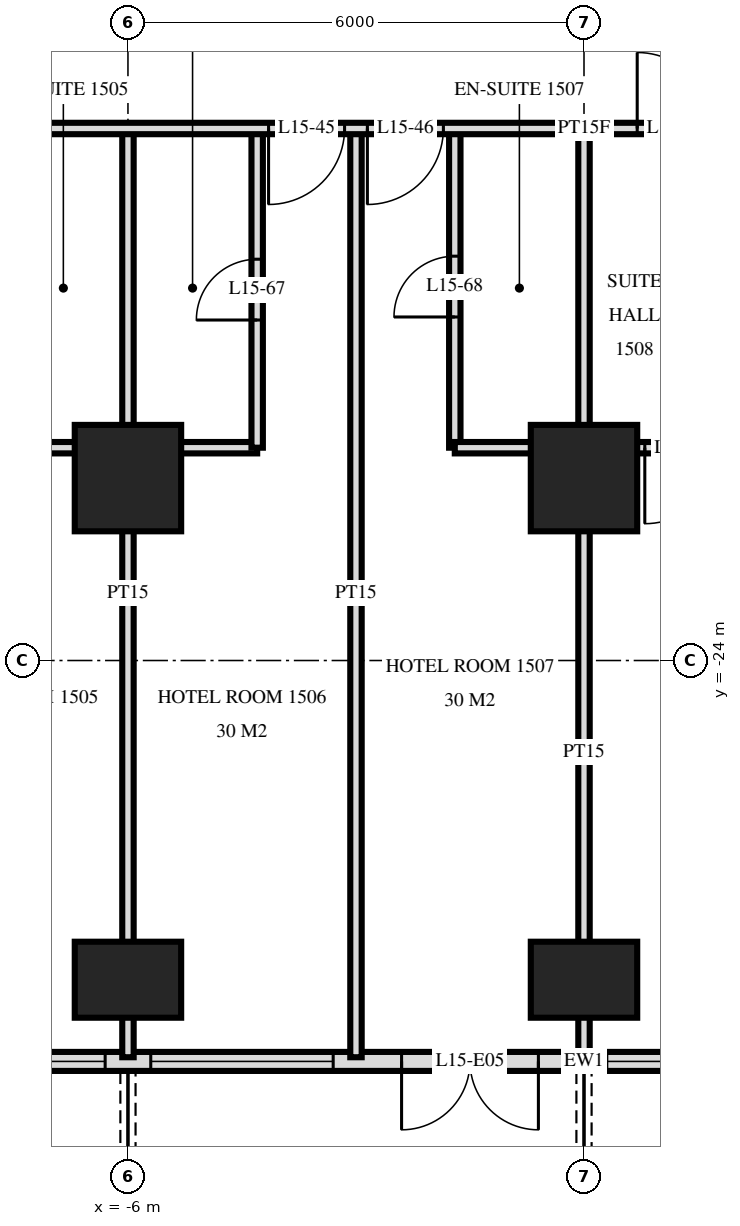
"""IFC4 building model, lengths in metres.
Left out: names, types, materials, properties, quantities, classifications, styles, units other than length and angle.
Written with IfcOpenShell. Run it as: python <this file> out.ifc"""

import sys

from ifc_helpers import new_model, si_unit, direction, frame, frame_2d, origin, origin_2d, place, context, subcontext, project, spatial, rectangle, extrude, element, fill, save


model = new_model("IFC4")
c1 = context("Model", 3, precision=1e-05, world=origin(), true_north=direction((0.0, 1.0)))
c2 = subcontext(c1, "Body", "Model", "MODEL_VIEW")
j1 = project(units=[si_unit("LENGTHUNIT", "METRE"), si_unit("PLANEANGLEUNIT", "RADIAN")], contexts=[c1])
p1 = place(None, origin())
s1 = spatial("IfcSite", under=j1, at=p1, CompositionType="ELEMENT")
p2 = place(p1, origin())
s2 = spatial("IfcBuilding", under=s1, at=p2, CompositionType="ELEMENT")
p3 = place(p2, frame((0.0, 0.0, 63.6)))
s3 = spatial("IfcBuildingStorey", under=s2, at=p3, CompositionType="ELEMENT", Elevation=63.6)
p4 = place(p3, frame((-6.0, -28.2, 0.0), z_axis=(0.0, 0.0, 1.0), x_axis=(1.0, 0.0, 0.0)))
e1 = element("IfcColumn", 1, at=p4, inside=s3, PredefinedType="COLUMN", context=c2, shape_type="SweptSolid", body=[
    extrude(rectangle(XDim=1.4, YDim=1.0, at=origin_2d()), origin(), (0.0, 0.0, 1.0), 3.6),
])
p5 = place(p3, frame((-6.0, -21.6, 0.0), z_axis=(0.0, 0.0, 1.0), x_axis=(1.0, 0.0, 0.0)))
e2 = element("IfcColumn", 2, at=p5, inside=s3, PredefinedType="COLUMN", context=c2, shape_type="SweptSolid", body=[
    extrude(rectangle(XDim=1.4, YDim=1.4, at=origin_2d()), origin(), (0.0, 0.0, 1.0), 3.6),
])
p6 = place(p3, frame((0.0, -28.2, 0.0), z_axis=(0.0, 0.0, 1.0), x_axis=(1.0, 0.0, 0.0)))
e3 = element("IfcColumn", 3, at=p6, inside=s3, PredefinedType="COLUMN", context=c2, shape_type="SweptSolid", body=[
    extrude(rectangle(XDim=1.4, YDim=1.0, at=origin_2d()), origin(), (0.0, 0.0, 1.0), 3.6),
])
p7 = place(p3, frame((0.0, -21.6, 0.0), z_axis=(0.0, 0.0, 1.0), x_axis=(1.0, 0.0, 0.0)))
e4 = element("IfcColumn", 4, at=p7, inside=s3, PredefinedType="COLUMN", context=c2, shape_type="SweptSolid", body=[
    extrude(rectangle(XDim=1.4, YDim=1.4, at=origin_2d()), origin(), (0.0, 0.0, 1.0), 3.6),
])
p8 = place(p3, frame((-28.775, -29.275, 0.0), z_axis=(0.0, 0.0, 1.0), x_axis=(1.0, 0.0, 0.0)))
e5 = element("IfcWall", 5, at=p8, inside=s3, PredefinedType="SOLIDWALL", context=c2, shape_type="SweptSolid", body=[
    extrude(rectangle(XDim=57.551, YDim=0.25, at=frame_2d((28.775, 0.0))), origin(), (0.0, 0.0, 1.0), 3.32),
])
p9 = place(p8, frame((0.575, 0.0, 0.0)))
e6 = element("IfcOpeningElement", 6, at=p9, cuts=e5, PredefinedType="OPENING", context=c2, shape_type="SweptSolid", body=[
    extrude(rectangle(XDim=1.8, YDim=2.4, at=frame_2d((0.9, 1.2))), frame((0.0, 0.135, 0.0), z_axis=(0.0, -1.0, 0.0), x_axis=(1.0, 0.0, 0.0)), (0.0, 0.0, 1.0), 0.27),
])
p10 = place(p8, frame((5.375, 0.0, 0.0)))
e7 = element("IfcOpeningElement", 7, at=p10, cuts=e5, PredefinedType="OPENING", context=c2, shape_type="SweptSolid", body=[
    extrude(rectangle(XDim=1.8, YDim=2.4, at=frame_2d((0.9, 1.2))), frame((0.0, 0.135, 0.0), z_axis=(0.0, -1.0, 0.0), x_axis=(1.0, 0.0, 0.0)), (0.0, 0.0, 1.0), 0.27),
])
p11 = place(p8, frame((8.075, 0.0, 0.3)))
e8 = element("IfcOpeningElement", 8, at=p11, cuts=e5, PredefinedType="OPENING", context=c2, shape_type="SweptSolid", body=[
    extrude(rectangle(XDim=2.4, YDim=2.1, at=frame_2d((1.2, 1.05))), frame((0.0, 0.135, 0.0), z_axis=(0.0, -1.0, 0.0), x_axis=(1.0, 0.0, 0.0)), (0.0, 0.0, 1.0), 0.27),
])
p12 = place(p8, frame((11.375, 0.0, 0.0)))
e9 = element("IfcOpeningElement", 9, at=p12, cuts=e5, PredefinedType="OPENING", context=c2, shape_type="SweptSolid", body=[
    extrude(rectangle(XDim=1.8, YDim=2.4, at=frame_2d((0.9, 1.2))), frame((0.0, 0.135, 0.0), z_axis=(0.0, -1.0, 0.0), x_axis=(1.0, 0.0, 0.0)), (0.0, 0.0, 1.0), 0.27),
])
p13 = place(p8, frame((14.075, 0.0, 0.3)))
e10 = element("IfcOpeningElement", 10, at=p13, cuts=e5, PredefinedType="OPENING", context=c2, shape_type="SweptSolid", body=[
    extrude(rectangle(XDim=2.4, YDim=2.1, at=frame_2d((1.2, 1.05))), frame((0.0, 0.135, 0.0), z_axis=(0.0, -1.0, 0.0), x_axis=(1.0, 0.0, 0.0)), (0.0, 0.0, 1.0), 0.27),
])
p14 = place(p8, frame((17.375, 0.0, 0.0)))
e11 = element("IfcOpeningElement", 11, at=p14, cuts=e5, PredefinedType="OPENING", context=c2, shape_type="SweptSolid", body=[
    extrude(rectangle(XDim=1.8, YDim=2.4, at=frame_2d((0.9, 1.2))), frame((0.0, 0.135, 0.0), z_axis=(0.0, -1.0, 0.0), x_axis=(1.0, 0.0, 0.0)), (0.0, 0.0, 1.0), 0.27),
])
p15 = place(p8, frame((20.075, 0.0, 0.3)))
e12 = element("IfcOpeningElement", 12, at=p15, cuts=e5, PredefinedType="OPENING", context=c2, shape_type="SweptSolid", body=[
    extrude(rectangle(XDim=2.4, YDim=2.1, at=frame_2d((1.2, 1.05))), frame((0.0, 0.135, 0.0), z_axis=(0.0, -1.0, 0.0), x_axis=(1.0, 0.0, 0.0)), (0.0, 0.0, 1.0), 0.27),
])
p16 = place(p8, frame((23.075, 0.0, 0.3)))
e13 = element("IfcOpeningElement", 13, at=p16, cuts=e5, PredefinedType="OPENING", context=c2, shape_type="SweptSolid", body=[
    extrude(rectangle(XDim=2.4, YDim=2.1, at=frame_2d((1.2, 1.05))), frame((0.0, 0.135, 0.0), z_axis=(0.0, -1.0, 0.0), x_axis=(1.0, 0.0, 0.0)), (0.0, 0.0, 1.0), 0.27),
])
p17 = place(p8, frame((26.375, 0.0, 0.0)))
e14 = element("IfcOpeningElement", 14, at=p17, cuts=e5, PredefinedType="OPENING", context=c2, shape_type="SweptSolid", body=[
    extrude(rectangle(XDim=1.8, YDim=2.4, at=frame_2d((0.9, 1.2))), frame((0.0, 0.135, 0.0), z_axis=(0.0, -1.0, 0.0), x_axis=(1.0, 0.0, 0.0)), (0.0, 0.0, 1.0), 0.27),
])
p18 = place(p8, frame((29.075, 0.0, 0.3)))
e15 = element("IfcOpeningElement", 15, at=p18, cuts=e5, PredefinedType="OPENING", context=c2, shape_type="SweptSolid", body=[
    extrude(rectangle(XDim=2.4, YDim=2.1, at=frame_2d((1.2, 1.05))), frame((0.0, 0.135, 0.0), z_axis=(0.0, -1.0, 0.0), x_axis=(1.0, 0.0, 0.0)), (0.0, 0.0, 1.0), 0.27),
])
p19 = place(p8, frame((32.375, 0.0, 0.0)))
e16 = element("IfcOpeningElement", 16, at=p19, cuts=e5, PredefinedType="OPENING", context=c2, shape_type="SweptSolid", body=[
    extrude(rectangle(XDim=1.8, YDim=2.4, at=frame_2d((0.9, 1.2))), frame((0.0, 0.135, 0.0), z_axis=(0.0, -1.0, 0.0), x_axis=(1.0, 0.0, 0.0)), (0.0, 0.0, 1.0), 0.27),
])
p20 = place(p8, frame((35.375, 0.0, 0.0)))
e17 = element("IfcOpeningElement", 17, at=p20, cuts=e5, PredefinedType="OPENING", context=c2, shape_type="SweptSolid", body=[
    extrude(rectangle(XDim=1.8, YDim=2.4, at=frame_2d((0.9, 1.2))), frame((0.0, 0.135, 0.0), z_axis=(0.0, -1.0, 0.0), x_axis=(1.0, 0.0, 0.0)), (0.0, 0.0, 1.0), 0.27),
])
p21 = place(p8, frame((38.075, 0.0, 0.3)))
e18 = element("IfcOpeningElement", 18, at=p21, cuts=e5, PredefinedType="OPENING", context=c2, shape_type="SweptSolid", body=[
    extrude(rectangle(XDim=2.4, YDim=2.1, at=frame_2d((1.2, 1.05))), frame((0.0, 0.135, 0.0), z_axis=(0.0, -1.0, 0.0), x_axis=(1.0, 0.0, 0.0)), (0.0, 0.0, 1.0), 0.27),
])
p22 = place(p8, frame((41.375, 0.0, 0.0)))
e19 = element("IfcOpeningElement", 19, at=p22, cuts=e5, PredefinedType="OPENING", context=c2, shape_type="SweptSolid", body=[
    extrude(rectangle(XDim=1.8, YDim=2.4, at=frame_2d((0.9, 1.2))), frame((0.0, 0.135, 0.0), z_axis=(0.0, -1.0, 0.0), x_axis=(1.0, 0.0, 0.0)), (0.0, 0.0, 1.0), 0.27),
])
p23 = place(p8, frame((44.075, 0.0, 0.3)))
e20 = element("IfcOpeningElement", 20, at=p23, cuts=e5, PredefinedType="OPENING", context=c2, shape_type="SweptSolid", body=[
    extrude(rectangle(XDim=2.4, YDim=2.1, at=frame_2d((1.2, 1.05))), frame((0.0, 0.135, 0.0), z_axis=(0.0, -1.0, 0.0), x_axis=(1.0, 0.0, 0.0)), (0.0, 0.0, 1.0), 0.27),
])
p24 = place(p8, frame((47.075, 0.0, 0.3)))
e21 = element("IfcOpeningElement", 21, at=p24, cuts=e5, PredefinedType="OPENING", context=c2, shape_type="SweptSolid", body=[
    extrude(rectangle(XDim=2.4, YDim=2.1, at=frame_2d((1.2, 1.05))), frame((0.0, 0.135, 0.0), z_axis=(0.0, -1.0, 0.0), x_axis=(1.0, 0.0, 0.0)), (0.0, 0.0, 1.0), 0.27),
])
p25 = place(p8, frame((50.375, 0.0, 0.0)))
e22 = element("IfcOpeningElement", 22, at=p25, cuts=e5, PredefinedType="OPENING", context=c2, shape_type="SweptSolid", body=[
    extrude(rectangle(XDim=1.8, YDim=2.4, at=frame_2d((0.9, 1.2))), frame((0.0, 0.135, 0.0), z_axis=(0.0, -1.0, 0.0), x_axis=(1.0, 0.0, 0.0)), (0.0, 0.0, 1.0), 0.27),
])
p26 = place(p8, frame((53.375, 0.0, 0.0)))
e23 = element("IfcOpeningElement", 23, at=p26, cuts=e5, PredefinedType="OPENING", context=c2, shape_type="SweptSolid", body=[
    extrude(rectangle(XDim=1.8, YDim=2.4, at=frame_2d((0.9, 1.2))), frame((0.0, 0.135, 0.0), z_axis=(0.0, -1.0, 0.0), x_axis=(1.0, 0.0, 0.0)), (0.0, 0.0, 1.0), 0.27),
])
p27 = place(p3, frame((0.0, -21.2, 0.0), z_axis=(0.0, 0.0, 1.0), x_axis=(0.0, 1.0, 0.0)))
e24 = element("IfcWall", 24, at=p27, inside=s3, PredefinedType="PARTITIONING", context=c2, shape_type="SweptSolid", body=[
    extrude(rectangle(XDim=4.2, YDim=0.15, at=frame_2d((2.1, 0.0))), origin(), (0.0, 0.0, 1.0), 3.32),
])
p28 = place(p3, frame((0.0, -29.22, 0.0), z_axis=(0.0, 0.0, 1.0), x_axis=(0.0, 1.0, 0.0)))
e25 = element("IfcWall", 25, at=p28, inside=s3, PredefinedType="PARTITIONING", context=c2, shape_type="SweptSolid", body=[
    extrude(rectangle(XDim=8.02, YDim=0.15, at=frame_2d((4.01, 0.0))), origin(), (0.0, 0.0, 1.0), 3.32),
])
p29 = place(p3, frame((-1.7, -21.2, 0.0), z_axis=(0.0, 0.0, 1.0), x_axis=(0.0, 1.0, 0.0)))
e26 = element("IfcWall", 26, at=p29, inside=s3, PredefinedType="PARTITIONING", context=c2, shape_type="SweptSolid", body=[
    extrude(rectangle(XDim=4.2, YDim=0.15, at=frame_2d((2.1, 0.0))), origin(), (0.0, 0.0, 1.0), 3.32),
])
p30 = place(p29, frame((1.72, 0.0, 0.0)))
e27 = element("IfcOpeningElement", 27, at=p30, cuts=e26, PredefinedType="OPENING", context=c2, shape_type="SweptSolid", body=[
    extrude(rectangle(XDim=0.8, YDim=2.1, at=frame_2d((0.4, 1.05))), frame((0.0, 0.085, 0.0), z_axis=(0.0, -1.0, 0.0), x_axis=(1.0, 0.0, 0.0)), (0.0, 0.0, 1.0), 0.17),
])
p31 = place(p3, frame((-3.0, -29.22, 0.0), z_axis=(0.0, 0.0, 1.0), x_axis=(0.0, 1.0, 0.0)))
e28 = element("IfcWall", 28, at=p31, inside=s3, PredefinedType="PARTITIONING", context=c2, shape_type="SweptSolid", body=[
    extrude(rectangle(XDim=12.22, YDim=0.15, at=frame_2d((6.11, 0.0))), origin(), (0.0, 0.0, 1.0), 3.32),
])
p32 = place(p3, frame((-4.3, -21.2, 0.0), z_axis=(0.0, 0.0, 1.0), x_axis=(0.0, 1.0, 0.0)))
e29 = element("IfcWall", 29, at=p32, inside=s3, PredefinedType="PARTITIONING", context=c2, shape_type="SweptSolid", body=[
    extrude(rectangle(XDim=4.2, YDim=0.15, at=frame_2d((2.1, 0.0))), origin(), (0.0, 0.0, 1.0), 3.32),
])
p33 = place(p32, frame((1.68, 0.0, 0.0)))
e30 = element("IfcOpeningElement", 30, at=p33, cuts=e29, PredefinedType="OPENING", context=c2, shape_type="SweptSolid", body=[
    extrude(rectangle(XDim=0.8, YDim=2.1, at=frame_2d((0.4, 1.05))), frame((0.0, 0.085, 0.0), z_axis=(0.0, -1.0, 0.0), x_axis=(1.0, 0.0, 0.0)), (0.0, 0.0, 1.0), 0.17),
])
p34 = place(p3, frame((-6.0, -29.22, 0.0), z_axis=(0.0, 0.0, 1.0), x_axis=(0.0, 1.0, 0.0)))
e31 = element("IfcWall", 31, at=p34, inside=s3, PredefinedType="PARTITIONING", context=c2, shape_type="SweptSolid", body=[
    extrude(rectangle(XDim=12.22, YDim=0.15, at=frame_2d((6.11, 0.0))), origin(), (0.0, 0.0, 1.0), 3.32),
])
p35 = place(p3, frame((0.0, -21.2, 0.0), z_axis=(0.0, 0.0, 1.0), x_axis=(1.0, 0.0, 0.0)))
e32 = element("IfcWall", 32, at=p35, inside=s3, PredefinedType="PARTITIONING", context=c2, shape_type="SweptSolid", body=[
    extrude(rectangle(XDim=2.4, YDim=0.15, at=frame_2d((1.2, 0.0))), origin(), (0.0, 0.0, 1.0), 3.32),
])
p36 = place(p35, frame((0.8, 0.0, 0.0)))
e33 = element("IfcOpeningElement", 33, at=p36, cuts=e32, PredefinedType="OPENING", context=c2, shape_type="SweptSolid", body=[
    extrude(rectangle(XDim=1.0, YDim=2.1, at=frame_2d((0.5, 1.05))), frame((0.0, 0.085, 0.0), z_axis=(0.0, -1.0, 0.0), x_axis=(1.0, 0.0, 0.0)), (0.0, 0.0, 1.0), 0.17),
])
p37 = place(p3, frame((-7.7, -21.2, 0.0), z_axis=(0.0, 0.0, 1.0), x_axis=(1.0, 0.0, 0.0)))
e34 = element("IfcWall", 34, at=p37, inside=s3, PredefinedType="PARTITIONING", context=c2, shape_type="SweptSolid", body=[
    extrude(rectangle(XDim=3.4, YDim=0.15, at=frame_2d((1.7, 0.0))), origin(), (0.0, 0.0, 1.0), 3.32),
])
p38 = place(p3, frame((-1.7, -21.2, 0.0), z_axis=(0.0, 0.0, 1.0), x_axis=(1.0, 0.0, 0.0)))
e35 = element("IfcWall", 35, at=p38, inside=s3, PredefinedType="PARTITIONING", context=c2, shape_type="SweptSolid", body=[
    extrude(rectangle(XDim=1.7, YDim=0.15, at=frame_2d((0.85, 0.0))), origin(), (0.0, 0.0, 1.0), 3.32),
])
p39 = place(p3, frame((-33.12, -17.0, 0.0), z_axis=(0.0, 0.0, 1.0), x_axis=(1.0, 0.0, 0.0)))
e36 = element("IfcWall", 36, at=p39, inside=s3, PredefinedType="PARTITIONING", context=c2, shape_type="SweptSolid", body=[
    extrude(rectangle(XDim=66.24, YDim=0.15, at=frame_2d((33.12, 0.0))), origin(), (0.0, 0.0, 1.0), 3.32),
])
p40 = place(p39, frame((12.27, 0.0, 0.0)))
e37 = element("IfcOpeningElement", 37, at=p40, cuts=e36, PredefinedType="OPENING", context=c2, shape_type="SweptSolid", body=[
    extrude(rectangle(XDim=1.0, YDim=2.1, at=frame_2d((0.5, 1.05))), frame((0.0, 0.085, 0.0), z_axis=(0.0, -1.0, 0.0), x_axis=(1.0, 0.0, 0.0)), (0.0, 0.0, 1.0), 0.17),
])
p41 = place(p39, frame((16.97, 0.0, 0.0)))
e38 = element("IfcOpeningElement", 38, at=p41, cuts=e36, PredefinedType="OPENING", context=c2, shape_type="SweptSolid", body=[
    extrude(rectangle(XDim=1.0, YDim=2.1, at=frame_2d((0.5, 1.05))), frame((0.0, 0.085, 0.0), z_axis=(0.0, -1.0, 0.0), x_axis=(1.0, 0.0, 0.0)), (0.0, 0.0, 1.0), 0.17),
])
p42 = place(p39, frame((18.27, 0.0, 0.0)))
e39 = element("IfcOpeningElement", 39, at=p42, cuts=e36, PredefinedType="OPENING", context=c2, shape_type="SweptSolid", body=[
    extrude(rectangle(XDim=1.0, YDim=2.1, at=frame_2d((0.5, 1.05))), frame((0.0, 0.085, 0.0), z_axis=(0.0, -1.0, 0.0), x_axis=(1.0, 0.0, 0.0)), (0.0, 0.0, 1.0), 0.17),
])
p43 = place(p39, frame((22.97, 0.0, 0.0)))
e40 = element("IfcOpeningElement", 40, at=p43, cuts=e36, PredefinedType="OPENING", context=c2, shape_type="SweptSolid", body=[
    extrude(rectangle(XDim=1.0, YDim=2.1, at=frame_2d((0.5, 1.05))), frame((0.0, 0.085, 0.0), z_axis=(0.0, -1.0, 0.0), x_axis=(1.0, 0.0, 0.0)), (0.0, 0.0, 1.0), 0.17),
])
p44 = place(p39, frame((24.27, 0.0, 0.0)))
e41 = element("IfcOpeningElement", 41, at=p44, cuts=e36, PredefinedType="OPENING", context=c2, shape_type="SweptSolid", body=[
    extrude(rectangle(XDim=1.0, YDim=2.1, at=frame_2d((0.5, 1.05))), frame((0.0, 0.085, 0.0), z_axis=(0.0, -1.0, 0.0), x_axis=(1.0, 0.0, 0.0)), (0.0, 0.0, 1.0), 0.17),
])
p45 = place(p39, frame((28.97, 0.0, 0.0)))
e42 = element("IfcOpeningElement", 42, at=p45, cuts=e36, PredefinedType="OPENING", context=c2, shape_type="SweptSolid", body=[
    extrude(rectangle(XDim=1.0, YDim=2.1, at=frame_2d((0.5, 1.05))), frame((0.0, 0.085, 0.0), z_axis=(0.0, -1.0, 0.0), x_axis=(1.0, 0.0, 0.0)), (0.0, 0.0, 1.0), 0.17),
])
p46 = place(p39, frame((30.27, 0.0, 0.0)))
e43 = element("IfcOpeningElement", 43, at=p46, cuts=e36, PredefinedType="OPENING", context=c2, shape_type="SweptSolid", body=[
    extrude(rectangle(XDim=1.0, YDim=2.1, at=frame_2d((0.5, 1.05))), frame((0.0, 0.085, 0.0), z_axis=(0.0, -1.0, 0.0), x_axis=(1.0, 0.0, 0.0)), (0.0, 0.0, 1.0), 0.17),
])
p47 = place(p39, frame((33.82, 0.0, 0.0)))
e44 = element("IfcOpeningElement", 44, at=p47, cuts=e36, PredefinedType="OPENING", context=c2, shape_type="SweptSolid", body=[
    extrude(rectangle(XDim=1.0, YDim=2.1, at=frame_2d((0.5, 1.05))), frame((0.0, 0.085, 0.0), z_axis=(0.0, -1.0, 0.0), x_axis=(1.0, 0.0, 0.0)), (0.0, 0.0, 1.0), 0.17),
])
p48 = place(p39, frame((46.27, 0.0, 0.0)))
e45 = element("IfcOpeningElement", 45, at=p48, cuts=e36, PredefinedType="OPENING", context=c2, shape_type="SweptSolid", body=[
    extrude(rectangle(XDim=1.0, YDim=2.1, at=frame_2d((0.5, 1.05))), frame((0.0, 0.085, 0.0), z_axis=(0.0, -1.0, 0.0), x_axis=(1.0, 0.0, 0.0)), (0.0, 0.0, 1.0), 0.17),
])
p49 = place(p39, frame((52.97, 0.0, 0.0)))
e46 = element("IfcOpeningElement", 46, at=p49, cuts=e36, PredefinedType="OPENING", context=c2, shape_type="SweptSolid", body=[
    extrude(rectangle(XDim=1.0, YDim=2.1, at=frame_2d((0.5, 1.05))), frame((0.0, 0.085, 0.0), z_axis=(0.0, -1.0, 0.0), x_axis=(1.0, 0.0, 0.0)), (0.0, 0.0, 1.0), 0.17),
])
p50 = place(p39, frame((6.05, 0.0, 0.0)))
e47 = element("IfcOpeningElement", 47, at=p50, cuts=e36, PredefinedType="OPENING", context=c2, shape_type="SweptSolid", body=[
    extrude(rectangle(XDim=1.0, YDim=2.1, at=frame_2d((0.5, 1.05))), frame((0.0, 0.085, 0.0), z_axis=(0.0, -1.0, 0.0), x_axis=(1.0, 0.0, 0.0)), (0.0, 0.0, 1.0), 0.17),
])
p51 = place(p39, frame((59.15, 0.0, 0.0)))
e48 = element("IfcOpeningElement", 48, at=p51, cuts=e36, PredefinedType="OPENING", context=c2, shape_type="SweptSolid", body=[
    extrude(rectangle(XDim=1.0, YDim=2.1, at=frame_2d((0.5, 1.05))), frame((0.0, 0.085, 0.0), z_axis=(0.0, -1.0, 0.0), x_axis=(1.0, 0.0, 0.0)), (0.0, 0.0, 1.0), 0.17),
])
p52 = place(p15, origin())
e49 = element("IfcWindow", 49, at=p52, inside=s3, PartitioningType="SINGLE_PANEL", PredefinedType="WINDOW", context=c2, shape_type="SweptSolid", body=[
    extrude(rectangle(XDim=2.4, YDim=2.1, at=frame_2d((1.2, 1.05))), frame((0.0, 0.03, 0.0), z_axis=(0.0, -1.0, 0.0), x_axis=(1.0, 0.0, 0.0)), (0.0, 0.0, 1.0), 0.06),
])
fill(e12, e49)
p53 = place(p16, origin())
e50 = element("IfcWindow", 50, at=p53, inside=s3, PartitioningType="SINGLE_PANEL", PredefinedType="WINDOW", context=c2, shape_type="SweptSolid", body=[
    extrude(rectangle(XDim=2.4, YDim=2.1, at=frame_2d((1.2, 1.05))), frame((0.0, 0.03, 0.0), z_axis=(0.0, -1.0, 0.0), x_axis=(1.0, 0.0, 0.0)), (0.0, 0.0, 1.0), 0.06),
])
fill(e13, e50)
p54 = place(p17, frame((0.9, 0.0, 0.0), z_axis=(0.0, 0.0, 1.0), x_axis=(-1.0, 0.0, 0.0)))
e51 = element("IfcDoor", 51, at=p54, inside=s3, OperationType="DOUBLE_DOOR_SINGLE_SWING", PredefinedType="DOOR", context=c2, shape_type="SweptSolid", body=[
    extrude(rectangle(XDim=1.8, YDim=2.4, at=frame_2d((0.0, 1.2))), frame((0.0, -0.025, 0.0), z_axis=(0.0, 1.0, 0.0), x_axis=(-1.0, 0.0, 0.0)), (0.0, 0.0, 1.0), 0.05),
])
fill(e14, e51)
p55 = place(p18, origin())
e52 = element("IfcWindow", 52, at=p55, inside=s3, PartitioningType="SINGLE_PANEL", PredefinedType="WINDOW", context=c2, shape_type="SweptSolid", body=[
    extrude(rectangle(XDim=2.4, YDim=2.1, at=frame_2d((1.2, 1.05))), frame((0.0, 0.03, 0.0), z_axis=(0.0, -1.0, 0.0), x_axis=(1.0, 0.0, 0.0)), (0.0, 0.0, 1.0), 0.06),
])
fill(e15, e52)
p56 = place(p45, frame((0.5, 0.0, 0.0), z_axis=(0.0, 0.0, 1.0), x_axis=(-1.0, 0.0, 0.0)))
e53 = element("IfcDoor", 53, at=p56, inside=s3, OperationType="SINGLE_SWING_LEFT", PredefinedType="DOOR", context=c2, shape_type="SweptSolid", body=[
    extrude(rectangle(XDim=1.0, YDim=2.1, at=frame_2d((0.0, 1.05))), frame((0.0, -0.025, 0.0), z_axis=(0.0, 1.0, 0.0), x_axis=(-1.0, 0.0, 0.0)), (0.0, 0.0, 1.0), 0.05),
])
fill(e42, e53)
p57 = place(p46, frame((0.5, 0.0, 0.0), z_axis=(0.0, 0.0, 1.0), x_axis=(-1.0, 0.0, 0.0)))
e54 = element("IfcDoor", 54, at=p57, inside=s3, OperationType="SINGLE_SWING_LEFT", PredefinedType="DOOR", context=c2, shape_type="SweptSolid", body=[
    extrude(rectangle(XDim=1.0, YDim=2.1, at=frame_2d((0.0, 1.05))), frame((0.0, -0.025, 0.0), z_axis=(0.0, 1.0, 0.0), x_axis=(-1.0, 0.0, 0.0)), (0.0, 0.0, 1.0), 0.05),
])
fill(e43, e54)
p58 = place(p47, origin())
e55 = element("IfcDoor", 55, at=p58, inside=s3, OperationType="SINGLE_SWING_RIGHT", PredefinedType="DOOR", context=c2, shape_type="SweptSolid", body=[
    extrude(rectangle(XDim=1.0, YDim=2.1, at=frame_2d((0.5, 1.05))), frame((0.0, 0.025, 0.0), z_axis=(0.0, -1.0, 0.0), x_axis=(1.0, 0.0, 0.0)), (0.0, 0.0, 1.0), 0.05),
])
fill(e44, e55)
p59 = place(p33, origin())
e56 = element("IfcDoor", 56, at=p59, inside=s3, OperationType="SINGLE_SWING_RIGHT", PredefinedType="DOOR", context=c2, shape_type="SweptSolid", body=[
    extrude(rectangle(XDim=0.8, YDim=2.1, at=frame_2d((0.4, 1.05))), frame((0.0, 0.025, 0.0), z_axis=(0.0, -1.0, 0.0), x_axis=(1.0, 0.0, 0.0)), (0.0, 0.0, 1.0), 0.05),
])
fill(e30, e56)
p60 = place(p30, origin())
e57 = element("IfcDoor", 57, at=p60, inside=s3, OperationType="SINGLE_SWING_RIGHT", PredefinedType="DOOR", context=c2, shape_type="SweptSolid", body=[
    extrude(rectangle(XDim=0.8, YDim=2.1, at=frame_2d((0.4, 1.05))), frame((0.0, 0.025, 0.0), z_axis=(0.0, -1.0, 0.0), x_axis=(1.0, 0.0, 0.0)), (0.0, 0.0, 1.0), 0.05),
])
fill(e27, e57)
p61 = place(p36, frame((0.5, 0.0, 0.0), z_axis=(0.0, 0.0, 1.0), x_axis=(-1.0, 0.0, 0.0)))
e58 = element("IfcDoor", 58, at=p61, inside=s3, OperationType="SINGLE_SWING_LEFT", PredefinedType="DOOR", context=c2, shape_type="SweptSolid", body=[
    extrude(rectangle(XDim=1.0, YDim=2.1, at=frame_2d((0.0, 1.05))), frame((0.0, -0.025, 0.0), z_axis=(0.0, 1.0, 0.0), x_axis=(-1.0, 0.0, 0.0)), (0.0, 0.0, 1.0), 0.05),
])
fill(e33, e58)
save(model, sys.argv[1])
